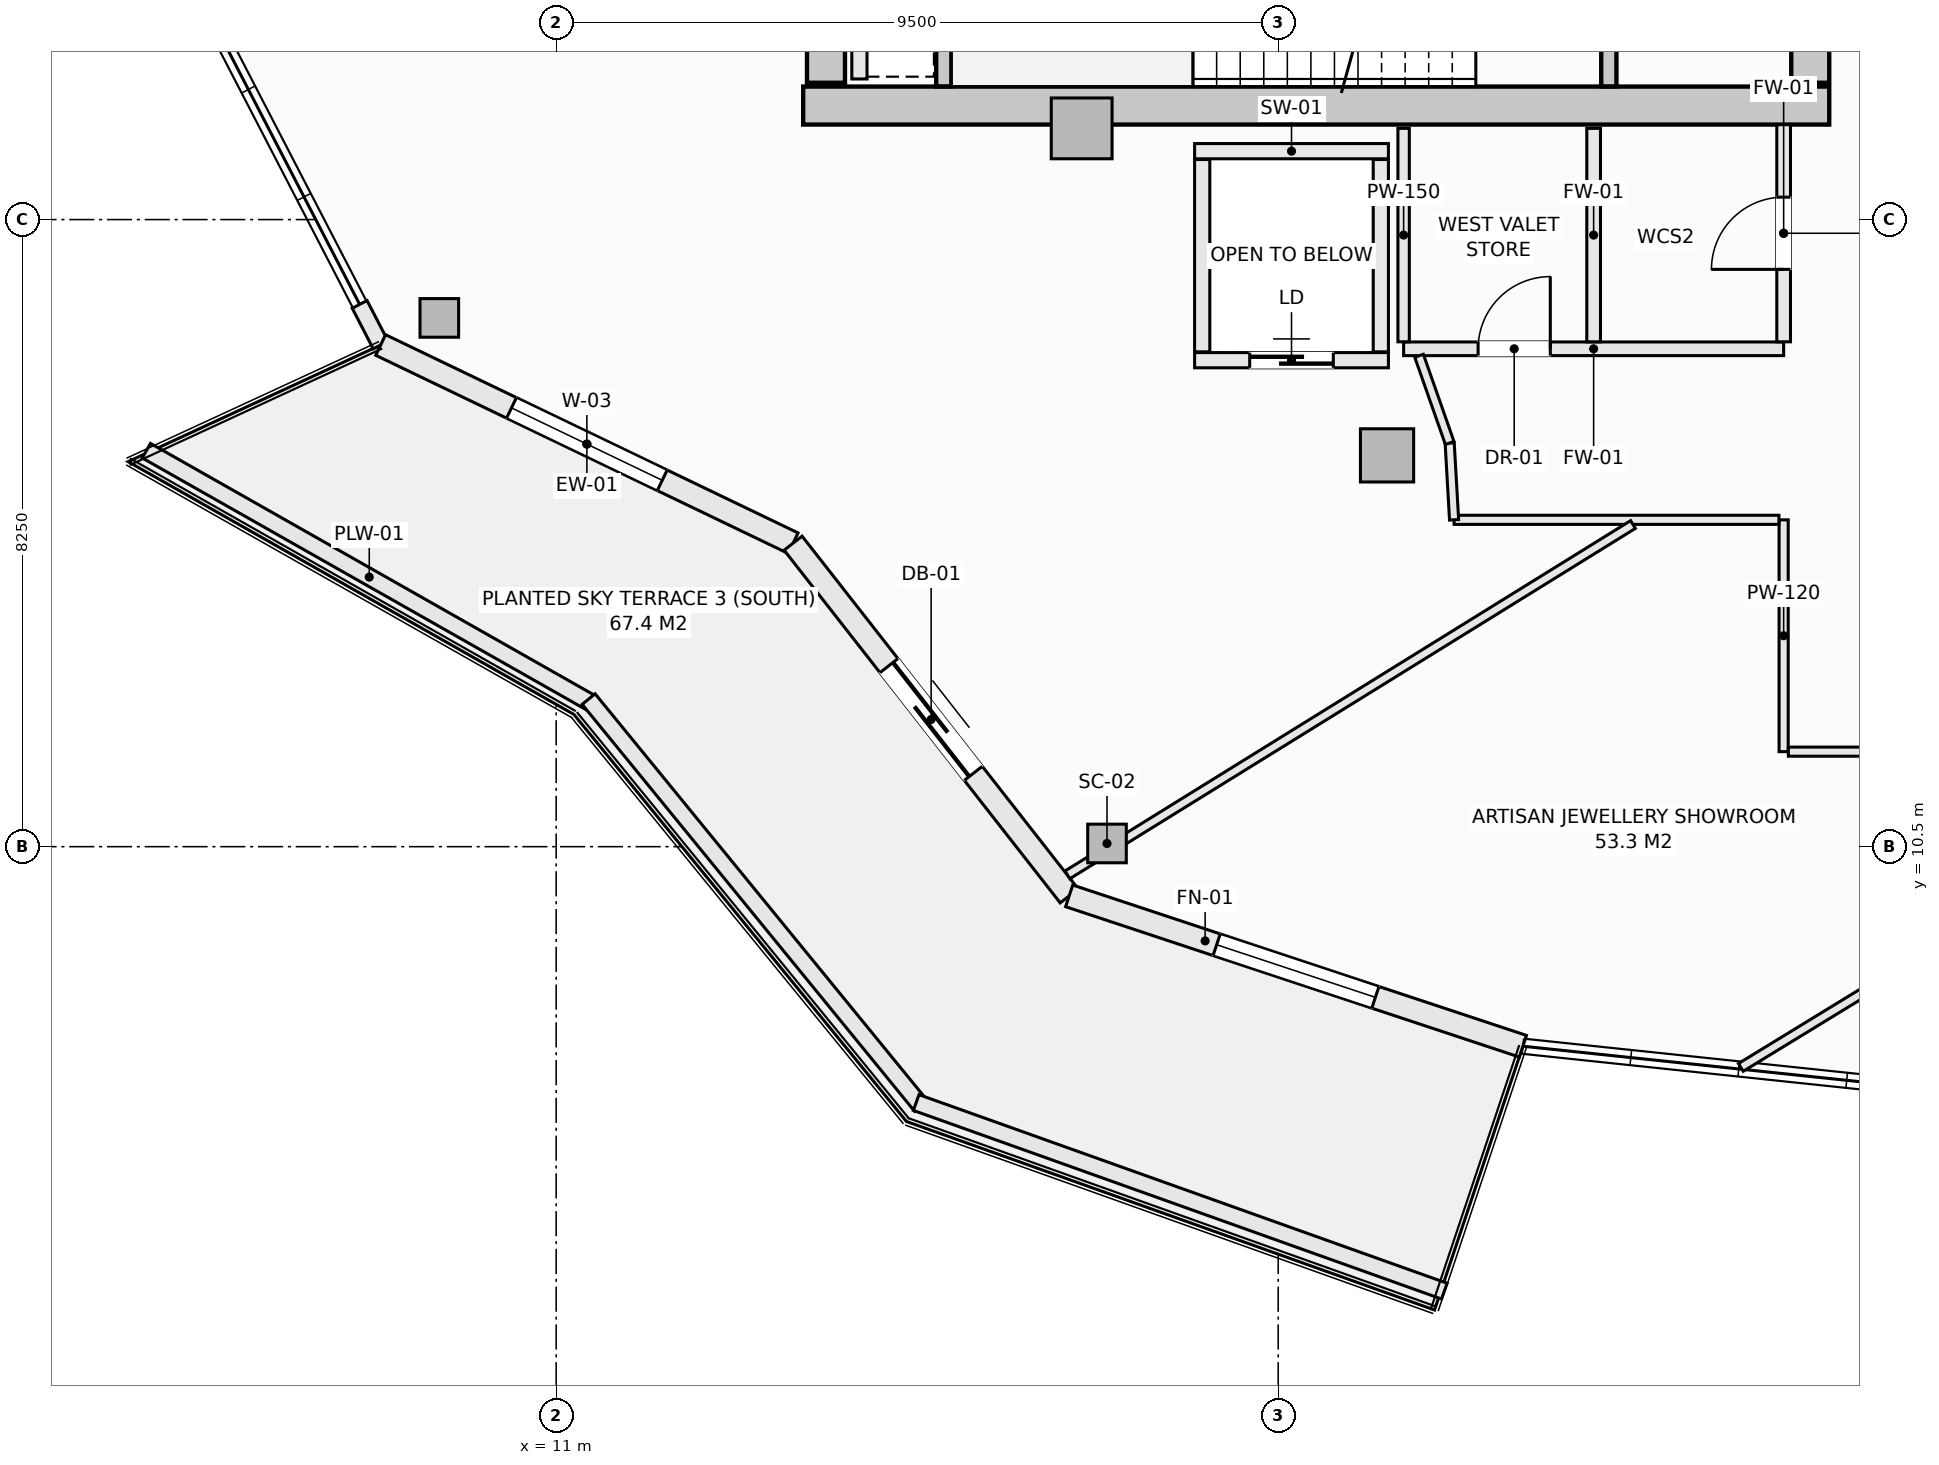
"""IFC4 building model, lengths in metres.
Left out: names, types, materials, properties, quantities, classifications, styles, units other than length and angle.
Written with IfcOpenShell. Run it as: python <this file> out.ifc"""

import sys

from ifc_helpers import new_model, si_unit, direction, frame, frame_2d, origin, origin_2d, place, context, subcontext, project, spatial, rectangle, hollow_rectangle, extrude, element, fill, save


model = new_model("IFC4")
c1 = context("Model", 3, precision=1e-05, world=origin(), true_north=direction((0.0, 1.0)))
c2 = subcontext(c1, "Body", "Model", "MODEL_VIEW")
j1 = project(units=[si_unit("LENGTHUNIT", "METRE"), si_unit("PLANEANGLEUNIT", "RADIAN")], contexts=[c1])
p1 = place(None, origin())
s1 = spatial("IfcSite", under=j1, at=p1, CompositionType="ELEMENT")
p2 = place(p1, origin())
s2 = spatial("IfcBuilding", under=s1, at=p2, CompositionType="ELEMENT")
p3 = place(p2, frame((0.0, 0.0, 191.9)))
s3 = spatial("IfcBuildingStorey", under=s2, at=p3, CompositionType="ELEMENT", Elevation=191.9)
p4 = place(p3, frame((14.25, 20.25, -0.28), z_axis=(0.0, 0.0, 1.0), x_axis=(1.0, 0.0, 0.0)))
e1 = element("IfcWall", 1, at=p4, inside=s3, PredefinedType="SHEAR", context=c2, shape_type="SweptSolid", body=[
    extrude(rectangle(XDim=13.5, YDim=0.5, at=frame_2d((6.75, 0.0))), origin(), (0.0, 0.0, 1.0), 4.51),
])
p5 = place(p3, frame((14.55, 20.55, -0.28), z_axis=(0.0, 0.0, 1.0), x_axis=(0.0, 1.0, 0.0)))
e2 = element("IfcWall", 2, at=p5, inside=s3, PredefinedType="SHEAR", context=c2, shape_type="SweptSolid", body=[
    extrude(rectangle(XDim=12.9, YDim=0.5, at=frame_2d((6.45, 0.0))), origin(), (0.0, 0.0, 1.0), 4.51),
])
p6 = place(p3, frame((27.5, 20.55, -0.28), z_axis=(0.0, 0.0, 1.0), x_axis=(0.0, 1.0, 0.0)))
e3 = element("IfcWall", 3, at=p6, inside=s3, PredefinedType="SHEAR", context=c2, shape_type="SweptSolid", body=[
    extrude(rectangle(XDim=1.5, YDim=0.5, at=frame_2d((0.75, 0.0))), origin(), (0.0, 0.0, 1.0), 4.51),
])
for number, where, z_axis, x_axis in (
    (4, (9.463, 17.456, -0.28), (0.0, 0.0, 1.0), (1.0, 0.0, 0.0)),
    (5, (18.247, 10.542, -0.28), (0.0, 0.0, 1.0), (1.0, 0.0, 0.0)),
):
    element("IfcColumn", number, at=place(p3, frame(where, z_axis=z_axis, x_axis=x_axis)), inside=s3, PredefinedType="COLUMN", context=c2, shape_type="SweptSolid", body=[
        extrude(hollow_rectangle(XDim=0.508, YDim=0.508, WallThickness=0.019, at=origin_2d()), origin(), (0.0, 0.0, 1.0), 4.51),
    ])
p7 = place(p3, frame((21.932, 15.648, -0.28), z_axis=(0.0, 0.0, 1.0), x_axis=(1.0, 0.0, 0.0)))
e6 = element("IfcColumn", 6, at=p7, inside=s3, PredefinedType="COLUMN", context=c2, shape_type="SweptSolid", body=[
    extrude(rectangle(XDim=0.7, YDim=0.7, at=origin_2d()), origin(), (0.0, 0.0, 1.0), 4.51),
])
p8 = place(p3, frame((17.914, 19.95, -0.28), z_axis=(0.0, 0.0, 1.0), x_axis=(1.0, 0.0, 0.0)))
e7 = element("IfcColumn", 7, at=p8, inside=s3, PredefinedType="PILASTER", context=c2, shape_type="SweptSolid", body=[
    extrude(rectangle(XDim=0.8, YDim=0.8, at=origin_2d()), origin(), (0.0, 0.0, 1.0), 4.51),
])
p9 = place(p3, frame((8.414, 17.634, 0.0), z_axis=(0.0, 0.0, 1.0), x_axis=(0.459831388304, -0.888006246786, 0.0)))
e8 = element("IfcWall", 8, at=p9, inside=s3, PredefinedType="SOLIDWALL", context=c2, shape_type="SweptSolid", body=[
    extrude(rectangle(XDim=0.602, YDim=0.22, at=frame_2d((0.301, 0.0))), origin(), (0.0, 0.0, 1.0), 3.805),
])
p10 = place(p3, frame((8.691, 17.1, 0.0), z_axis=(0.0, 0.0, 1.0), x_axis=(0.901348331142, -0.433094892545, 0.0)))
e9 = element("IfcWall", 9, at=p10, inside=s3, PredefinedType="SOLIDWALL", context=c2, shape_type="SweptSolid", body=[
    extrude(rectangle(XDim=6.021, YDim=0.3, at=frame_2d((3.01, 0.0))), origin(), (0.0, 0.0, 1.0), 3.805),
])
p11 = place(p10, frame((1.91, 0.0, 0.72)))
e10 = element("IfcOpeningElement", 10, at=p11, cuts=e9, PredefinedType="OPENING", context=c2, shape_type="SweptSolid", body=[
    extrude(rectangle(XDim=2.2, YDim=1.65, at=frame_2d((1.1, 0.825))), frame((0.0, 0.16, 0.0), z_axis=(0.0, -1.0, 0.0), x_axis=(1.0, 0.0, 0.0)), (0.0, 0.0, 1.0), 0.32),
])
p12 = place(p3, frame((14.117, 14.493, 0.0), z_axis=(0.0, 0.0, 1.0), x_axis=(0.616450126935, -0.787393955401, 0.0)))
e11 = element("IfcWall", 11, at=p12, inside=s3, PredefinedType="SOLIDWALL", context=c2, shape_type="SweptSolid", body=[
    extrude(rectangle(XDim=5.893, YDim=0.3, at=frame_2d((2.946, 0.0))), origin(), (0.0, 0.0, 1.0), 3.805),
])
p13 = place(p12, frame((2.046, 0.0, 0.0)))
e12 = element("IfcOpeningElement", 12, at=p13, cuts=e11, PredefinedType="OPENING", context=c2, shape_type="SweptSolid", body=[
    extrude(rectangle(XDim=1.8, YDim=2.25, at=frame_2d((0.9, 1.125))), frame((0.0, 0.16, 0.0), z_axis=(0.0, -1.0, 0.0), x_axis=(1.0, 0.0, 0.0)), (0.0, 0.0, 1.0), 0.32),
])
p14 = place(p3, frame((17.75, 9.853, 0.0), z_axis=(0.0, 0.0, 1.0), x_axis=(0.949240877604, -0.314550085495, 0.0)))
e13 = element("IfcWall", 13, at=p14, inside=s3, PredefinedType="SOLIDWALL", context=c2, shape_type="SweptSolid", body=[
    extrude(rectangle(XDim=6.288, YDim=0.3, at=frame_2d((3.144, 0.0))), origin(), (0.0, 0.0, 1.0), 3.805),
])
p15 = place(p14, frame((2.044, 0.0, 0.72)))
e14 = element("IfcOpeningElement", 14, at=p15, cuts=e13, PredefinedType="OPENING", context=c2, shape_type="SweptSolid", body=[
    extrude(rectangle(XDim=2.2, YDim=1.65, at=frame_2d((1.1, 0.825))), frame((0.0, 0.16, 0.0), z_axis=(0.0, -1.0, 0.0), x_axis=(1.0, 0.0, 0.0)), (0.0, 0.0, 1.0), 0.32),
])
p16 = place(p3, frame((5.608, 15.709, 0.0), z_axis=(0.0, 0.0, 1.0), x_axis=(0.869860619267, -0.493297580623, 0.0)))
e15 = element("IfcWall", 15, at=p16, inside=s3, PredefinedType="PARAPET", context=c2, shape_type="SweptSolid", body=[
    extrude(rectangle(XDim=6.743, YDim=0.22, at=frame_2d((3.371, 0.0))), origin(), (0.0, 0.0, 1.0), 0.52),
])
p17 = place(p3, frame((11.427, 12.441, 0.0), z_axis=(0.0, 0.0, 1.0), x_axis=(0.632697312147, -0.774399193699, 0.0)))
e16 = element("IfcWall", 16, at=p17, inside=s3, PredefinedType="PARAPET", context=c2, shape_type="SweptSolid", body=[
    extrude(rectangle(XDim=6.914, YDim=0.22, at=frame_2d((3.457, 0.0))), origin(), (0.0, 0.0, 1.0), 0.52),
])
p18 = place(p3, frame((15.737, 7.134, 0.0), z_axis=(0.0, 0.0, 1.0), x_axis=(0.941780086523, -0.336229488042, 0.0)))
e17 = element("IfcWall", 17, at=p18, inside=s3, PredefinedType="PARAPET", context=c2, shape_type="SweptSolid", body=[
    extrude(rectangle(XDim=7.378, YDim=0.22, at=frame_2d((3.689, 0.0))), origin(), (0.0, 0.0, 1.0), 0.52),
])
p19 = place(p3, frame((24.85, 20.502, -0.28), z_axis=(0.0, 0.0, 1.0), x_axis=(0.0, 1.0, 0.0)))
e18 = element("IfcWall", 18, at=p19, inside=s3, PredefinedType="SHEAR", context=c2, shape_type="SweptSolid", body=[
    extrude(rectangle(XDim=3.038, YDim=0.2, at=frame_2d((1.519, 0.0))), origin(), (0.0, 0.0, 1.0), 4.51),
])
p20 = place(p19, frame((0.969, 0.0, 0.28)))
e19 = element("IfcOpeningElement", 19, at=p20, cuts=e18, PredefinedType="OPENING", context=c2, shape_type="SweptSolid", body=[
    extrude(rectangle(XDim=1.1, YDim=2.15, at=frame_2d((0.55, 1.075))), frame((0.0, 0.11, 0.0), z_axis=(0.0, -1.0, 0.0), x_axis=(1.0, 0.0, 0.0)), (0.0, 0.0, 1.0), 0.22),
])
p21 = place(p3, frame((16.1, 20.502, -0.28), z_axis=(0.0, 0.0, 1.0), x_axis=(0.0, 1.0, 0.0)))
e20 = element("IfcWall", 20, at=p21, inside=s3, PredefinedType="SHEAR", context=c2, shape_type="SweptSolid", body=[
    extrude(rectangle(XDim=3.036, YDim=0.2, at=frame_2d((1.518, 0.0))), origin(), (0.0, 0.0, 1.0), 4.51),
])
p22 = place(p3, frame((19.4, 19.65, 0.0), z_axis=(0.0, 0.0, 1.0), x_axis=(1.0, 0.0, 0.0)))
e21 = element("IfcWall", 21, at=p22, inside=s3, PredefinedType="SOLIDWALL", context=c2, shape_type="SweptSolid", body=[
    extrude(rectangle(XDim=2.55, YDim=0.2, at=frame_2d((1.275, 0.0))), origin(), (0.0, 0.0, 1.0), 4.23),
])
p23 = place(p3, frame((19.4, 16.9, 0.0), z_axis=(0.0, 0.0, 1.0), x_axis=(1.0, 0.0, 0.0)))
e22 = element("IfcWall", 22, at=p23, inside=s3, PredefinedType="SOLIDWALL", context=c2, shape_type="SweptSolid", body=[
    extrude(rectangle(XDim=2.55, YDim=0.2, at=frame_2d((1.275, 0.0))), origin(), (0.0, 0.0, 1.0), 4.23),
])
p24 = place(p23, frame((0.725, 0.0, 0.0)))
e23 = element("IfcOpeningElement", 23, at=p24, cuts=e22, PredefinedType="OPENING", context=c2, shape_type="SweptSolid", body=[
    extrude(rectangle(XDim=1.1, YDim=2.2, at=frame_2d((0.55, 1.1))), frame((0.0, 0.11, 0.0), z_axis=(0.0, -1.0, 0.0), x_axis=(1.0, 0.0, 0.0)), (0.0, 0.0, 1.0), 0.22),
])
for number, where, z_axis, x_axis in (
    (24, (19.5, 17.01, 0.0), (0.0, 0.0, 1.0), (0.0, 1.0, 0.0)),
    (25, (21.85, 17.01, 0.0), (0.0, 0.0, 1.0), (0.0, 1.0, 0.0)),
):
    element("IfcWall", number, at=place(p3, frame(where, z_axis=z_axis, x_axis=x_axis)), inside=s3, PredefinedType="SOLIDWALL", context=c2, shape_type="SweptSolid", body=[
        extrude(rectangle(XDim=2.53, YDim=0.2, at=frame_2d((1.265, 0.0))), origin(), (0.0, 0.0, 1.0), 4.23),
    ])
p25 = place(p3, frame((14.99, 20.6, 0.0), z_axis=(0.0, 0.0, 1.0), x_axis=(0.0, 1.0, 0.0)))
e26 = element("IfcWall", 26, at=p25, inside=s3, PredefinedType="SOLIDWALL", context=c2, shape_type="SweptSolid", body=[
    extrude(rectangle(XDim=2.85, YDim=0.2, at=frame_2d((1.425, 0.0))), origin(), (0.0, 0.0, 1.0), 4.23),
])
p26 = place(p3, frame((22.15, 17.05, 0.0), z_axis=(0.0, 0.0, 1.0), x_axis=(1.0, 0.0, 0.0)))
e27 = element("IfcWall", 27, at=p26, inside=s3, PredefinedType="SOLIDWALL", context=c2, shape_type="SweptSolid", body=[
    extrude(rectangle(XDim=5.0, YDim=0.18, at=frame_2d((2.5, 0.0))), origin(), (0.0, 0.0, 1.0), 4.23),
])
p27 = place(p26, frame((0.98, 0.0, 0.0)))
e28 = element("IfcOpeningElement", 28, at=p27, cuts=e27, PredefinedType="OPENING", context=c2, shape_type="SweptSolid", body=[
    extrude(rectangle(XDim=0.95, YDim=2.1, at=frame_2d((0.475, 1.05))), frame((0.0, 0.1, 0.0), z_axis=(0.0, -1.0, 0.0), x_axis=(1.0, 0.0, 0.0)), (0.0, 0.0, 1.0), 0.2),
])
p28 = place(p3, frame((22.15, 17.142, 0.0), z_axis=(0.0, 0.0, 1.0), x_axis=(0.0, 1.0, 0.0)))
e29 = element("IfcWall", 29, at=p28, inside=s3, PredefinedType="PARTITIONING", context=c2, shape_type="SweptSolid", body=[
    extrude(rectangle(XDim=2.808, YDim=0.15, at=frame_2d((1.404, 0.0))), origin(), (0.0, 0.0, 1.0), 4.23),
])
p29 = place(p3, frame((24.65, 17.142, 0.0), z_axis=(0.0, 0.0, 1.0), x_axis=(0.0, 1.0, 0.0)))
e30 = element("IfcWall", 30, at=p29, inside=s3, PredefinedType="SOLIDWALL", context=c2, shape_type="SweptSolid", body=[
    extrude(rectangle(XDim=2.808, YDim=0.18, at=frame_2d((1.404, 0.0))), origin(), (0.0, 0.0, 1.0), 4.23),
])
p30 = place(p3, frame((27.15, 11.75, 0.0), z_axis=(0.0, 0.0, 1.0), x_axis=(0.0, 1.0, 0.0)))
e31 = element("IfcWall", 31, at=p30, inside=s3, PredefinedType="PARTITIONING", context=c2, shape_type="SweptSolid", body=[
    extrude(rectangle(XDim=3.05, YDim=0.12, at=frame_2d((1.525, 0.0))), origin(), (0.0, 0.0, 1.0), 4.23),
])
p31 = place(p3, frame((27.15, 17.142, 0.0), z_axis=(0.0, 0.0, 1.0), x_axis=(0.0, 1.0, 0.0)))
e32 = element("IfcWall", 32, at=p31, inside=s3, PredefinedType="SOLIDWALL", context=c2, shape_type="SweptSolid", body=[
    extrude(rectangle(XDim=2.856, YDim=0.18, at=frame_2d((1.428, 0.0))), origin(), (0.0, 0.0, 1.0), 4.23),
])
p32 = place(p31, frame((0.953, 0.0, 0.0)))
e33 = element("IfcOpeningElement", 33, at=p32, cuts=e32, PredefinedType="OPENING", context=c2, shape_type="SweptSolid", body=[
    extrude(rectangle(XDim=0.95, YDim=2.1, at=frame_2d((0.475, 1.05))), frame((0.0, 0.1, 0.0), z_axis=(0.0, -1.0, 0.0), x_axis=(1.0, 0.0, 0.0)), (0.0, 0.0, 1.0), 0.2),
])
p33 = place(p3, frame((27.212, 11.75, 0.0), z_axis=(0.0, 0.0, 1.0), x_axis=(1.0, 0.0, 0.0)))
e34 = element("IfcWall", 34, at=p33, inside=s3, PredefinedType="PARTITIONING", context=c2, shape_type="SweptSolid", body=[
    extrude(rectangle(XDim=8.676, YDim=0.12, at=frame_2d((4.338, 0.0))), origin(), (0.0, 0.0, 1.0), 4.23),
])
p34 = place(p33, frame((2.926, 0.0, 0.0)))
e35 = element("IfcOpeningElement", 35, at=p34, cuts=e34, PredefinedType="OPENING", context=c2, shape_type="SweptSolid", body=[
    extrude(rectangle(XDim=0.95, YDim=2.1, at=frame_2d((0.475, 1.05))), frame((0.0, 0.07, 0.0), z_axis=(0.0, -1.0, 0.0), x_axis=(1.0, 0.0, 0.0)), (0.0, 0.0, 1.0), 0.14),
])
p35 = place(p33, frame((6.633, 0.0, 0.0)))
e36 = element("IfcOpeningElement", 36, at=p35, cuts=e34, PredefinedType="OPENING", context=c2, shape_type="SweptSolid", body=[
    extrude(rectangle(XDim=0.95, YDim=2.1, at=frame_2d((0.475, 1.05))), frame((0.0, 0.07, 0.0), z_axis=(0.0, -1.0, 0.0), x_axis=(1.0, 0.0, 0.0)), (0.0, 0.0, 1.0), 0.14),
])
p36 = place(p3, frame((22.814, 14.8, 0.0), z_axis=(0.0, 0.0, 1.0), x_axis=(1.0, 0.0, 0.0)))
e37 = element("IfcWall", 37, at=p36, inside=s3, PredefinedType="PARTITIONING", context=c2, shape_type="SweptSolid", body=[
    extrude(rectangle(XDim=4.274, YDim=0.12, at=frame_2d((2.137, 0.0))), origin(), (0.0, 0.0, 1.0), 4.23),
])
p37 = place(p3, frame((22.756, 15.811, 0.0), z_axis=(0.0, 0.0, 1.0), x_axis=(0.057139047697, -0.998366230012, 0.0)))
e38 = element("IfcWall", 38, at=p37, inside=s3, PredefinedType="PARTITIONING", context=c2, shape_type="SweptSolid", body=[
    extrude(rectangle(XDim=1.013, YDim=0.12, at=frame_2d((0.506, 0.0))), origin(), (0.0, 0.0, 1.0), 4.23),
])
p38 = place(p3, frame((22.353, 16.958, 0.0), z_axis=(0.0, 0.0, 1.0), x_axis=(0.331370038458, -0.943500873138, 0.0)))
e39 = element("IfcWall", 39, at=p38, inside=s3, PredefinedType="PARTITIONING", context=c2, shape_type="SweptSolid", body=[
    extrude(rectangle(XDim=1.216, YDim=0.12, at=frame_2d((0.608, 0.0))), origin(), (0.0, 0.0, 1.0), 4.23),
])
p39 = place(p3, frame((17.727, 10.129, 0.0), z_axis=(0.0, 0.0, 1.0), x_axis=(0.850147430438, 0.526544724141, 0.0)))
e40 = element("IfcWall", 40, at=p39, inside=s3, PredefinedType="PARTITIONING", context=c2, shape_type="SweptSolid", body=[
    extrude(rectangle(XDim=8.753, YDim=0.12, at=frame_2d((4.376, 0.0))), origin(), (0.0, 0.0, 1.0), 3.678),
])
p40 = place(p3, frame((26.586, 7.596, 0.0), z_axis=(0.0, 0.0, 1.0), x_axis=(0.853233376363, 0.52152929492, 0.0)))
e41 = element("IfcWall", 41, at=p40, inside=s3, PredefinedType="PARTITIONING", context=c2, shape_type="SweptSolid", body=[
    extrude(rectangle(XDim=7.847, YDim=0.12, at=frame_2d((3.923, 0.0))), origin(), (0.0, 0.0, 1.0), 4.23),
])
p41 = place(p11, origin())
e42 = element("IfcWindow", 42, at=p41, inside=s3, PartitioningType="SINGLE_PANEL", PredefinedType="WINDOW", context=c2, shape_type="SweptSolid", body=[
    extrude(rectangle(XDim=2.2, YDim=1.65, at=frame_2d((1.1, 0.825))), frame((0.0, 0.03, 0.0), z_axis=(0.0, -1.0, 0.0), x_axis=(1.0, 0.0, 0.0)), (0.0, 0.0, 1.0), 0.06),
])
fill(e10, e42)
p42 = place(p13, frame((1.8, 0.0, 0.0), z_axis=(0.0, 0.0, 1.0), x_axis=(-1.0, 0.0, 0.0)))
e43 = element("IfcDoor", 43, at=p42, inside=s3, OperationType="SLIDING_TO_LEFT", PredefinedType="DOOR", context=c2, shape_type="SweptSolid", body=[
    extrude(rectangle(XDim=1.8, YDim=2.25, at=frame_2d((0.9, 1.125))), frame((0.0, 0.025, 0.0), z_axis=(0.0, -1.0, 0.0), x_axis=(1.0, 0.0, 0.0)), (0.0, 0.0, 1.0), 0.05),
])
fill(e12, e43)
p43 = place(p15, origin())
e44 = element("IfcWindow", 44, at=p43, inside=s3, PartitioningType="SINGLE_PANEL", PredefinedType="WINDOW", context=c2, shape_type="SweptSolid", body=[
    extrude(rectangle(XDim=2.2, YDim=1.65, at=frame_2d((1.1, 0.825))), frame((0.0, 0.03, 0.0), z_axis=(0.0, -1.0, 0.0), x_axis=(1.0, 0.0, 0.0)), (0.0, 0.0, 1.0), 0.06),
])
fill(e14, e44)
p44 = place(p24, origin())
e45 = element("IfcDoor", 45, at=p44, inside=s3, OperationType="SLIDING_TO_LEFT", PredefinedType="DOOR", context=c2, shape_type="SweptSolid", body=[
    extrude(rectangle(XDim=1.1, YDim=2.2, at=frame_2d((0.55, 1.1))), frame((0.0, 0.025, 0.0), z_axis=(0.0, -1.0, 0.0), x_axis=(1.0, 0.0, 0.0)), (0.0, 0.0, 1.0), 0.05),
])
fill(e23, e45)
p45 = place(p27, origin())
e46 = element("IfcDoor", 46, at=p45, inside=s3, OperationType="SINGLE_SWING_RIGHT", PredefinedType="DOOR", context=c2, shape_type="SweptSolid", body=[
    extrude(rectangle(XDim=0.95, YDim=2.1, at=frame_2d((0.475, 1.05))), frame((0.0, 0.025, 0.0), z_axis=(0.0, -1.0, 0.0), x_axis=(1.0, 0.0, 0.0)), (0.0, 0.0, 1.0), 0.05),
])
fill(e28, e46)
p46 = place(p32, origin())
e47 = element("IfcDoor", 47, at=p46, inside=s3, OperationType="SINGLE_SWING_LEFT", PredefinedType="DOOR", context=c2, shape_type="SweptSolid", body=[
    extrude(rectangle(XDim=0.95, YDim=2.1, at=frame_2d((0.475, 1.05))), frame((0.0, 0.025, 0.0), z_axis=(0.0, -1.0, 0.0), x_axis=(1.0, 0.0, 0.0)), (0.0, 0.0, 1.0), 0.05),
])
fill(e33, e47)
save(model, sys.argv[1])
